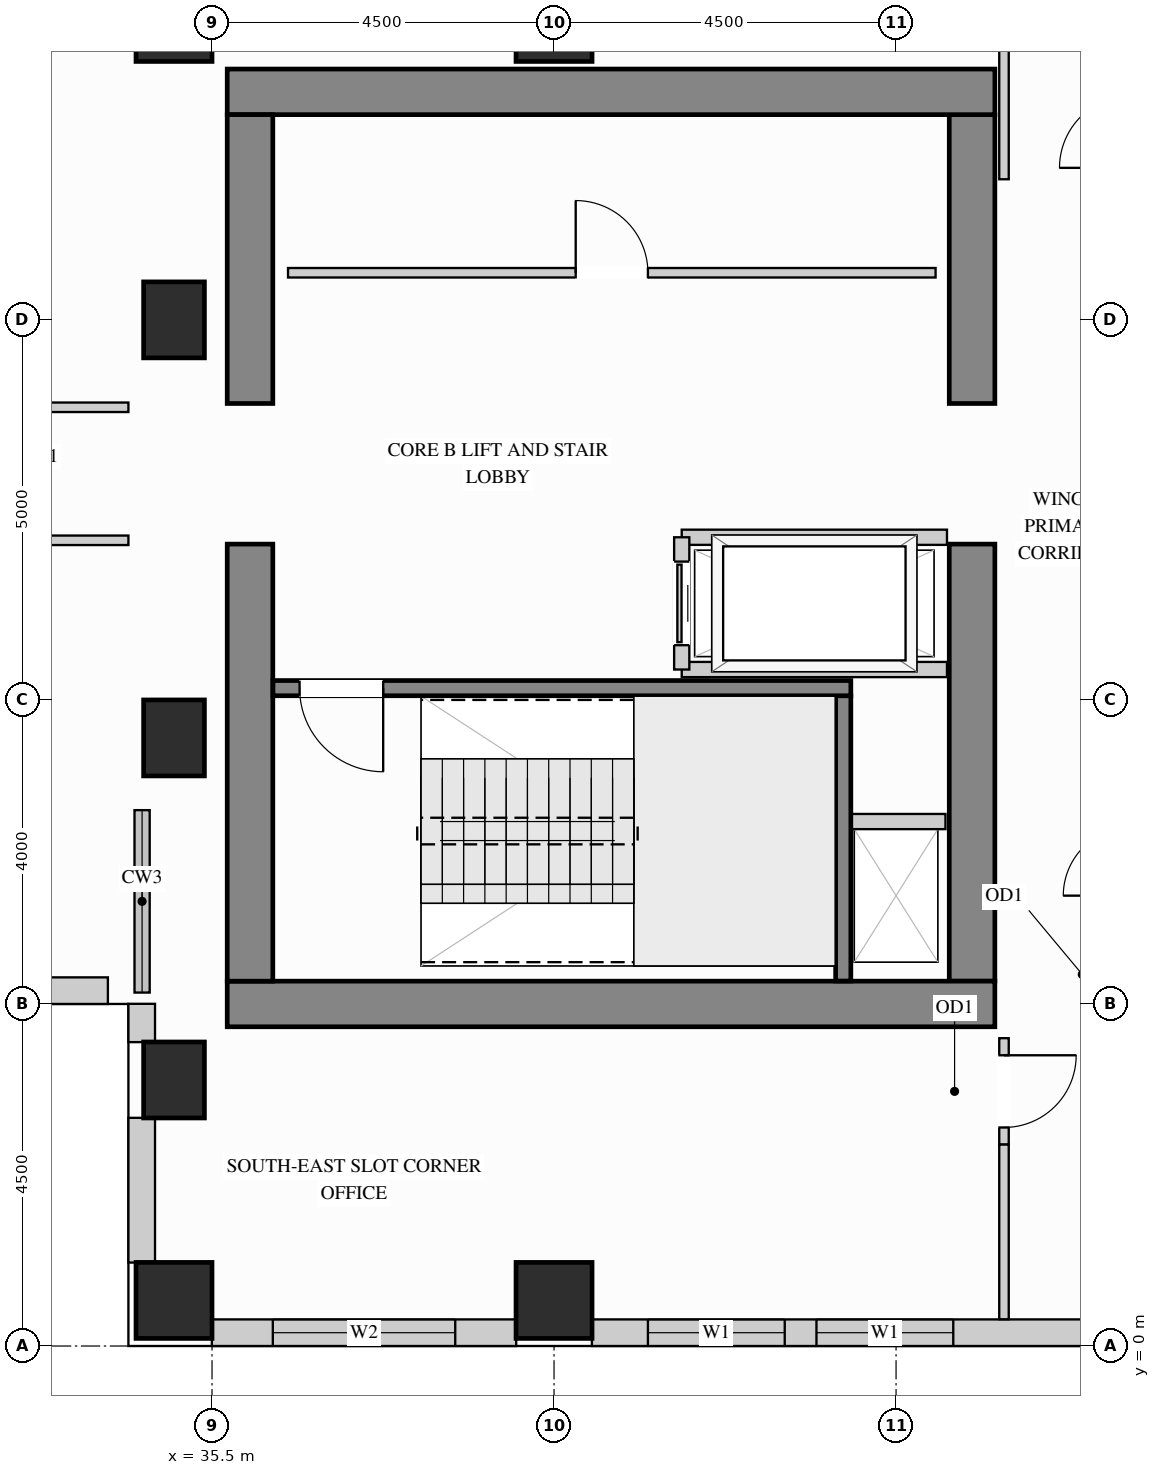
"""IFC4 building model, lengths in metres.
Left out: names, types, materials, properties, quantities, classifications, styles, units other than length and angle.
Written with IfcOpenShell. Run it as: python <this file> out.ifc"""

import sys

from ifc_helpers import new_model, si_unit, direction, frame, frame_2d, origin, origin_2d, place, context, subcontext, project, spatial, rectangle, extrude, source, transform, mapped, element, fill, save


model = new_model("IFC4")
c1 = context("Model", 3, precision=1e-05, world=origin(), true_north=direction((0.0, 1.0)))
c2 = subcontext(c1, "Body", "Model", "MODEL_VIEW")
j1 = project(units=[si_unit("LENGTHUNIT", "METRE"), si_unit("PLANEANGLEUNIT", "RADIAN")], contexts=[c1])
p1 = place(None, origin())
s1 = spatial("IfcSite", under=j1, at=p1, CompositionType="ELEMENT")
p2 = place(p1, origin())
s2 = spatial("IfcBuilding", under=s1, at=p2, CompositionType="ELEMENT")
p3 = place(p2, frame((0.0, 0.0, 146.7)))
s3 = spatial("IfcBuildingStorey", under=s2, at=p3, CompositionType="ELEMENT", Elevation=146.7)
m1 = source(origin(), c2, "Body", "SweptSolid", [
    extrude(rectangle(XDim=0.8, YDim=1.0, at=origin_2d()), origin(), (0.0, 0.0, 1.0), 3.4),
])
for number, where, z_axis, x_axis in (
    (1, (35.0, 13.5, 0.0), (0.0, 0.0, 1.0), (1.0, 0.0, 0.0)),
    (2, (35.0, 3.5, 0.0), (0.0, 0.0, 1.0), (1.0, 0.0, 0.0)),
    (3, (35.0, 8.0, 0.0), (0.0, 0.0, 1.0), (1.0, 0.0, 0.0)),
):
    element("IfcColumn", number, at=place(p3, frame(where, z_axis=z_axis, x_axis=x_axis)), inside=s3, PredefinedType="COLUMN", context=c2, shape_type="MappedRepresentation", body=[
        mapped(m1, transform((0.0, 0.0, 0.0), x_axis=(1.0, 0.0, 0.0), y_axis=(0.0, 1.0, 0.0), z_axis=(0.0, 0.0, 1.0))),
    ])
m2 = source(origin(), c2, "Body", "SweptSolid", [
    extrude(rectangle(XDim=1.0, YDim=1.0, at=origin_2d()), origin(), (0.0, 0.0, 1.0), 3.4),
])
for number, where, z_axis, x_axis in (
    (4, (35.0, 17.4, 0.0), (0.0, 0.0, 1.0), (1.0, 0.0, 0.0)),
    (5, (40.0, 17.4, 0.0), (0.0, 0.0, 1.0), (1.0, 0.0, 0.0)),
    (6, (35.0, 0.6, 0.0), (0.0, 0.0, 1.0), (1.0, 0.0, 0.0)),
    (7, (40.0, 0.6, 0.0), (0.0, 0.0, 1.0), (1.0, 0.0, 0.0)),
):
    element("IfcColumn", number, at=place(p3, frame(where, z_axis=z_axis, x_axis=x_axis)), inside=s3, PredefinedType="COLUMN", context=c2, shape_type="MappedRepresentation", body=[
        mapped(m2, transform((0.0, 0.0, 0.0), x_axis=(1.0, 0.0, 0.0), y_axis=(0.0, 1.0, 0.0), z_axis=(0.0, 0.0, 1.0))),
    ])
m3 = source(origin(), c2, "Body", "SweptSolid", [
    extrude(rectangle(XDim=5.75, YDim=0.6, at=frame_2d((2.875, 0.0))), origin(), (0.0, 0.0, 1.0), 3.4),
])
p4 = place(p3, frame((45.5, 4.8, 0.0), z_axis=(0.0, 0.0, 1.0), x_axis=(0.0, 1.0, 0.0)))
e8 = element("IfcWall", 8, at=p4, inside=s3, PredefinedType="SHEAR", context=c2, shape_type="MappedRepresentation", body=[
    mapped(m3, transform((0.0, 0.0, 0.0), x_axis=(1.0, 0.0, 0.0), y_axis=(0.0, 1.0, 0.0), z_axis=(0.0, 0.0, 1.0))),
])
m4 = source(origin(), c2, "Body", "SweptSolid", [
    extrude(rectangle(XDim=3.8, YDim=0.6, at=frame_2d((1.9, 0.0))), origin(), (0.0, 0.0, 1.0), 3.4),
])
p5 = place(p3, frame((45.5, 12.4, 0.0), z_axis=(0.0, 0.0, 1.0), x_axis=(0.0, 1.0, 0.0)))
e9 = element("IfcWall", 9, at=p5, inside=s3, PredefinedType="SHEAR", context=c2, shape_type="MappedRepresentation", body=[
    mapped(m4, transform((0.0, 0.0, 0.0), x_axis=(1.0, 0.0, 0.0), y_axis=(0.0, 1.0, 0.0), z_axis=(0.0, 0.0, 1.0))),
])
m5 = source(origin(), c2, "Body", "SweptSolid", [
    extrude(rectangle(XDim=10.1, YDim=0.6, at=frame_2d((5.05, 0.0))), origin(), (0.0, 0.0, 1.0), 3.4),
])
for number, where, z_axis, x_axis in (
    (10, (35.7, 16.5, 0.0), (0.0, 0.0, 1.0), (1.0, 0.0, 0.0)),
    (11, (35.7, 4.5, 0.0), (0.0, 0.0, 1.0), (1.0, 0.0, 0.0)),
):
    element("IfcWall", number, at=place(p3, frame(where, z_axis=z_axis, x_axis=x_axis)), inside=s3, PredefinedType="SHEAR", context=c2, shape_type="MappedRepresentation", body=[
        mapped(m5, transform((0.0, 0.0, 0.0), x_axis=(1.0, 0.0, 0.0), y_axis=(0.0, 1.0, 0.0), z_axis=(0.0, 0.0, 1.0))),
    ])
p6 = place(p3, frame((36.0, 4.8, 0.0), z_axis=(0.0, 0.0, 1.0), x_axis=(0.0, 1.0, 0.0)))
e12 = element("IfcWall", 12, at=p6, inside=s3, PredefinedType="SHEAR", context=c2, shape_type="MappedRepresentation", body=[
    mapped(m3, transform((0.0, 0.0, 0.0), x_axis=(1.0, 0.0, 0.0), y_axis=(0.0, 1.0, 0.0), z_axis=(0.0, 0.0, 1.0))),
])
p7 = place(p3, frame((36.0, 12.4, 0.0), z_axis=(0.0, 0.0, 1.0), x_axis=(0.0, 1.0, 0.0)))
e13 = element("IfcWall", 13, at=p7, inside=s3, PredefinedType="SHEAR", context=c2, shape_type="MappedRepresentation", body=[
    mapped(m4, transform((0.0, 0.0, 0.0), x_axis=(1.0, 0.0, 0.0), y_axis=(0.0, 1.0, 0.0), z_axis=(0.0, 0.0, 1.0))),
])
p8 = place(p3, frame((19.15, 4.675, 0.0), z_axis=(0.0, 0.0, 1.0), x_axis=(1.0, 0.0, 0.0)))
e14 = element("IfcWall", 14, at=p8, inside=s3, PredefinedType="SOLIDWALL", context=c2, shape_type="SweptSolid", body=[
    extrude(rectangle(XDim=14.98, YDim=0.35, at=frame_2d((7.49, 0.0))), origin(), (0.0, 0.0, 1.0), 3.385),
])
p9 = place(p8, frame((1.73, 0.0, 0.78)))
e15 = element("IfcOpeningElement", 15, at=p9, cuts=e14, PredefinedType="OPENING", context=c2, shape_type="SweptSolid", body=[
    extrude(rectangle(XDim=1.5, YDim=2.0, at=frame_2d((0.75, 1.0))), frame((0.0, 0.185, 0.0), z_axis=(0.0, -1.0, 0.0), x_axis=(1.0, 0.0, 0.0)), (0.0, 0.0, 1.0), 0.37),
])
p10 = place(p8, frame((4.64, 0.0, 0.78)))
e16 = element("IfcOpeningElement", 16, at=p10, cuts=e14, PredefinedType="OPENING", context=c2, shape_type="SweptSolid", body=[
    extrude(rectangle(XDim=1.5, YDim=2.0, at=frame_2d((0.75, 1.0))), frame((0.0, 0.185, 0.0), z_axis=(0.0, -1.0, 0.0), x_axis=(1.0, 0.0, 0.0)), (0.0, 0.0, 1.0), 0.37),
])
p11 = place(p8, frame((9.253, 0.0, 0.78)))
e17 = element("IfcOpeningElement", 17, at=p11, cuts=e14, PredefinedType="OPENING", context=c2, shape_type="SweptSolid", body=[
    extrude(rectangle(XDim=1.5, YDim=2.0, at=frame_2d((0.75, 1.0))), frame((0.0, 0.185, 0.0), z_axis=(0.0, -1.0, 0.0), x_axis=(1.0, 0.0, 0.0)), (0.0, 0.0, 1.0), 0.37),
])
p12 = place(p8, frame((11.957, 0.0, 0.78)))
e18 = element("IfcOpeningElement", 18, at=p12, cuts=e14, PredefinedType="OPENING", context=c2, shape_type="SweptSolid", body=[
    extrude(rectangle(XDim=1.5, YDim=2.0, at=frame_2d((0.75, 1.0))), frame((0.0, 0.185, 0.0), z_axis=(0.0, -1.0, 0.0), x_axis=(1.0, 0.0, 0.0)), (0.0, 0.0, 1.0), 0.37),
])
m6 = source(origin(), c2, "Body", "SweptSolid", [
    extrude(rectangle(XDim=0.504, YDim=0.35, at=frame_2d((0.252, 0.0))), origin(), (0.0, 0.0, 1.0), 3.385),
])
p13 = place(p3, frame((34.575, 4.502, 0.0), z_axis=(0.0, 0.0, 1.0), x_axis=(0.0, -1.0, 0.0)))
e19 = element("IfcWall", 19, at=p13, inside=s3, PredefinedType="SOLIDWALL", context=c2, shape_type="MappedRepresentation", body=[
    mapped(m6, transform((0.0, 0.0, 0.0), x_axis=(1.0, 0.0, 0.0), y_axis=(0.0, 1.0, 0.0), z_axis=(0.0, 0.0, 1.0))),
])
m7 = source(origin(), c2, "Body", "SweptSolid", [
    extrude(rectangle(XDim=1.904, YDim=0.35, at=frame_2d((0.952, 0.0))), origin(), (0.0, 0.0, 1.0), 2.612),
])
p14 = place(p3, frame((34.575, 3.002, 0.0), z_axis=(0.0, 0.0, 1.0), x_axis=(0.0, -1.0, 0.0)))
e20 = element("IfcWall", 20, at=p14, inside=s3, PredefinedType="SOLIDWALL", context=c2, shape_type="MappedRepresentation", body=[
    mapped(m7, transform((0.0, 0.0, 0.0), x_axis=(1.0, 0.0, 0.0), y_axis=(0.0, 1.0, 0.0), z_axis=(0.0, 0.0, 1.0))),
])
p15 = place(p3, frame((35.498, 0.175, 0.0), z_axis=(0.0, 0.0, 1.0), x_axis=(1.0, 0.0, 0.0)))
e21 = element("IfcWall", 21, at=p15, inside=s3, PredefinedType="SOLIDWALL", context=c2, shape_type="SweptSolid", body=[
    extrude(rectangle(XDim=4.004, YDim=0.35, at=frame_2d((2.002, 0.0))), origin(), (0.0, 0.0, 1.0), 2.612),
])
p16 = place(p15, frame((0.802, 0.0, 0.78)))
e22 = element("IfcOpeningElement", 22, at=p16, cuts=e21, PredefinedType="OPENING", context=c2, shape_type="SweptSolid", body=[
    extrude(rectangle(XDim=2.4, YDim=1.652, at=frame_2d((1.2, 0.826))), frame((0.0, 0.185, 0.0), z_axis=(0.0, -1.0, 0.0), x_axis=(1.0, 0.0, 0.0)), (0.0, 0.0, 1.0), 0.37),
])
p17 = place(p3, frame((40.498, 0.175, 0.0), z_axis=(0.0, 0.0, 1.0), x_axis=(1.0, 0.0, 0.0)))
e23 = element("IfcWall", 23, at=p17, inside=s3, PredefinedType="SOLIDWALL", context=c2, shape_type="SweptSolid", body=[
    extrude(rectangle(XDim=6.604, YDim=0.35, at=frame_2d((3.302, 0.0))), origin(), (0.0, 0.0, 1.0), 2.612),
])
p18 = place(p17, frame((0.737, 0.0, 0.78)))
e24 = element("IfcOpeningElement", 24, at=p18, cuts=e23, PredefinedType="OPENING", context=c2, shape_type="SweptSolid", body=[
    extrude(rectangle(XDim=1.8, YDim=1.652, at=frame_2d((0.9, 0.826))), frame((0.0, 0.185, 0.0), z_axis=(0.0, -1.0, 0.0), x_axis=(1.0, 0.0, 0.0)), (0.0, 0.0, 1.0), 0.37),
])
p19 = place(p17, frame((2.955, 0.0, 0.78)))
e25 = element("IfcOpeningElement", 25, at=p19, cuts=e23, PredefinedType="OPENING", context=c2, shape_type="SweptSolid", body=[
    extrude(rectangle(XDim=1.8, YDim=1.652, at=frame_2d((0.9, 0.826))), frame((0.0, 0.185, 0.0), z_axis=(0.0, -1.0, 0.0), x_axis=(1.0, 0.0, 0.0)), (0.0, 0.0, 1.0), 0.37),
])
p20 = place(p3, frame((36.5, 14.12, 0.0), z_axis=(0.0, 0.0, 1.0), x_axis=(1.0, 0.0, 0.0)))
e26 = element("IfcWall", 26, at=p20, inside=s3, PredefinedType="PARTITIONING", context=c2, shape_type="SweptSolid", body=[
    extrude(rectangle(XDim=8.52, YDim=0.125, at=frame_2d((4.26, 0.0))), origin(), (0.0, 0.0, 1.0), 3.385),
])
p21 = place(p20, frame((3.785, 0.0, 0.0)))
e27 = element("IfcOpeningElement", 27, at=p21, cuts=e26, PredefinedType="OPENING", context=c2, shape_type="SweptSolid", body=[
    extrude(rectangle(XDim=0.95, YDim=2.15, at=frame_2d((0.475, 1.075))), frame((0.0, 0.073, 0.0), z_axis=(0.0, -1.0, 0.0), x_axis=(1.0, 0.0, 0.0)), (0.0, 0.0, 1.0), 0.145),
])
m8 = source(origin(), c2, "Body", "SweptSolid", [
    extrude(rectangle(XDim=2.298, YDim=0.125, at=frame_2d((1.149, 0.0))), origin(), (0.0, 0.0, 1.0), 3.385),
])
p22 = place(p3, frame((45.92, 15.35, 0.0), z_axis=(0.0, 0.0, 1.0), x_axis=(0.0, 1.0, 0.0)))
e28 = element("IfcWall", 28, at=p22, inside=s3, PredefinedType="PARTITIONING", context=c2, shape_type="MappedRepresentation", body=[
    mapped(m8, transform((0.0, 0.0, 0.0), x_axis=(1.0, 0.0, 0.0), y_axis=(0.0, 1.0, 0.0), z_axis=(0.0, 0.0, 1.0))),
])
p23 = place(p3, frame((45.92, 2.65, 0.0), z_axis=(0.0, 0.0, 1.0), x_axis=(0.0, 1.0, 0.0)))
e29 = element("IfcWall", 29, at=p23, inside=s3, PredefinedType="PARTITIONING", context=c2, shape_type="SweptSolid", body=[
    extrude(rectangle(XDim=1.4, YDim=0.125, at=frame_2d((0.7, 0.0))), origin(), (0.0, 0.0, 1.0), 3.385),
])
p24 = place(p23, frame((0.225, 0.0, 0.0)))
e30 = element("IfcOpeningElement", 30, at=p24, cuts=e29, PredefinedType="OPENING", context=c2, shape_type="SweptSolid", body=[
    extrude(rectangle(XDim=0.95, YDim=2.15, at=frame_2d((0.475, 1.075))), frame((0.0, 0.073, 0.0), z_axis=(0.0, -1.0, 0.0), x_axis=(1.0, 0.0, 0.0)), (0.0, 0.0, 1.0), 0.145),
])
p25 = place(p3, frame((45.92, 0.352, 0.0), z_axis=(0.0, 0.0, 1.0), x_axis=(0.0, 1.0, 0.0)))
e31 = element("IfcWall", 31, at=p25, inside=s3, PredefinedType="PARTITIONING", context=c2, shape_type="MappedRepresentation", body=[
    mapped(m8, transform((0.0, 0.0, 0.0), x_axis=(1.0, 0.0, 0.0), y_axis=(0.0, 1.0, 0.0), z_axis=(0.0, 0.0, 1.0))),
])
p26 = place(p3, frame((29.85, 12.35, 0.0), z_axis=(0.0, 0.0, 1.0), x_axis=(1.0, 0.0, 0.0)))
e32 = element("IfcWall", 32, at=p26, inside=s3, PredefinedType="PARTITIONING", context=c2, shape_type="SweptSolid", body=[
    extrude(rectangle(XDim=4.55, YDim=0.125, at=frame_2d((2.275, 0.0))), origin(), (0.0, 0.0, 1.0), 3.385),
])
p27 = place(p26, frame((1.8, 0.0, 0.0)))
e33 = element("IfcOpeningElement", 33, at=p27, cuts=e32, PredefinedType="OPENING", context=c2, shape_type="SweptSolid", body=[
    extrude(rectangle(XDim=0.95, YDim=2.15, at=frame_2d((0.475, 1.075))), frame((0.0, 0.073, 0.0), z_axis=(0.0, -1.0, 0.0), x_axis=(1.0, 0.0, 0.0)), (0.0, 0.0, 1.0), 0.145),
])
p28 = place(p3, frame((26.95, 10.6, 0.0), z_axis=(0.0, 0.0, 1.0), x_axis=(1.0, 0.0, 0.0)))
e34 = element("IfcWall", 34, at=p28, inside=s3, PredefinedType="PARTITIONING", context=c2, shape_type="SweptSolid", body=[
    extrude(rectangle(XDim=7.45, YDim=0.125, at=frame_2d((3.725, 0.0))), origin(), (0.0, 0.0, 1.0), 3.385),
])
p29 = place(p28, frame((4.478, 0.0, 0.0)))
e35 = element("IfcOpeningElement", 35, at=p29, cuts=e34, PredefinedType="OPENING", context=c2, shape_type="SweptSolid", body=[
    extrude(rectangle(XDim=0.95, YDim=2.15, at=frame_2d((0.475, 1.075))), frame((0.0, 0.073, 0.0), z_axis=(0.0, -1.0, 0.0), x_axis=(1.0, 0.0, 0.0)), (0.0, 0.0, 1.0), 0.145),
])
m9 = source(origin(), c2, "Body", "SweptSolid", [
    extrude(rectangle(XDim=1.3, YDim=0.2, at=frame_2d((0.65, 0.0))), origin(), (0.0, 0.0, 1.0), 3.385),
])
p30 = place(p3, frame((43.85, 6.9, 0.0), z_axis=(0.0, 0.0, 1.0), x_axis=(1.0, 0.0, 0.0)))
e36 = element("IfcWall", 36, at=p30, inside=s3, PredefinedType="PARTITIONING", context=c2, shape_type="MappedRepresentation", body=[
    mapped(m9, transform((0.0, 0.0, 0.0), x_axis=(1.0, 0.0, 0.0), y_axis=(0.0, 1.0, 0.0), z_axis=(0.0, 0.0, 1.0))),
])
m10 = source(origin(), c2, "Body", "SweptSolid", [
    extrude(rectangle(XDim=3.49, YDim=0.2, at=frame_2d((1.745, 0.0))), origin(), (0.0, 0.0, 1.0), 3.385),
])
for number, where, z_axis, x_axis in (
    (37, (41.68, 10.64, 0.0), (0.0, 0.0, 1.0), (1.0, 0.0, 0.0)),
    (38, (41.68, 8.9, 0.0), (0.0, 0.0, 1.0), (1.0, 0.0, 0.0)),
):
    element("IfcWall", number, at=place(p3, frame(where, z_axis=z_axis, x_axis=x_axis)), inside=s3, PredefinedType="PARTITIONING", context=c2, shape_type="MappedRepresentation", body=[
        mapped(m10, transform((0.0, 0.0, 0.0), x_axis=(1.0, 0.0, 0.0), y_axis=(0.0, 1.0, 0.0), z_axis=(0.0, 0.0, 1.0))),
    ])
p31 = place(p3, frame((41.68, 8.9, 0.0), z_axis=(0.0, 0.0, 1.0), x_axis=(0.0, 1.0, 0.0)))
e39 = element("IfcWall", 39, at=p31, inside=s3, PredefinedType="PARTITIONING", context=c2, shape_type="SweptSolid", body=[
    extrude(rectangle(XDim=1.74, YDim=0.2, at=frame_2d((0.87, 0.0))), origin(), (0.0, 0.0, 1.0), 3.385),
])
p32 = place(p31, frame((0.32, 0.0, 0.0)))
e40 = element("IfcOpeningElement", 40, at=p32, cuts=e39, PredefinedType="OPENING", context=c2, shape_type="SweptSolid", body=[
    extrude(rectangle(XDim=1.1, YDim=2.2, at=frame_2d((0.55, 1.1))), frame((0.0, 0.11, 0.0), z_axis=(0.0, -1.0, 0.0), x_axis=(1.0, 0.0, 0.0)), (0.0, 0.0, 1.0), 0.22),
])
m11 = source(origin(), c2, "Body", "SweptSolid", [
    extrude(rectangle(XDim=3.753, YDim=0.2, at=frame_2d((1.876, 0.0))), origin(), (0.0, 0.0, 1.0), 3.4),
])
p33 = place(p3, frame((43.805, 4.802, 0.0), z_axis=(0.0, 0.0, 1.0), x_axis=(0.0, 1.0, 0.0)))
e41 = element("IfcWall", 41, at=p33, inside=s3, PredefinedType="SHEAR", context=c2, shape_type="MappedRepresentation", body=[
    mapped(m11, transform((0.0, 0.0, 0.0), x_axis=(1.0, 0.0, 0.0), y_axis=(0.0, 1.0, 0.0), z_axis=(0.0, 0.0, 1.0))),
])
p34 = place(p3, frame((36.302, 8.655, 0.0), z_axis=(0.0, 0.0, 1.0), x_axis=(1.0, 0.0, 0.0)))
e42 = element("IfcWall", 42, at=p34, inside=s3, PredefinedType="SHEAR", context=c2, shape_type="SweptSolid", body=[
    extrude(rectangle(XDim=7.603, YDim=0.2, at=frame_2d((3.802, 0.0))), origin(), (0.0, 0.0, 1.0), 3.4),
])
p35 = place(p34, frame((0.35, 0.0, 0.0)))
e43 = element("IfcOpeningElement", 43, at=p35, cuts=e42, PredefinedType="OPENING", context=c2, shape_type="SweptSolid", body=[
    extrude(rectangle(XDim=1.1, YDim=2.15, at=frame_2d((0.55, 1.075))), frame((0.0, 0.11, 0.0), z_axis=(0.0, -1.0, 0.0), x_axis=(1.0, 0.0, 0.0)), (0.0, 0.0, 1.0), 0.22),
])
m12 = source(origin(), c2, "Body", "SweptSolid", [
    extrude(rectangle(XDim=1.1, YDim=2.2, at=frame_2d((0.55, 1.1))), frame((0.0, 0.025, 0.0), z_axis=(0.0, -1.0, 0.0), x_axis=(1.0, 0.0, 0.0)), (0.0, 0.0, 1.0), 0.05),
])
p36 = place(p32, origin())
e44 = element("IfcDoor", 44, at=p36, inside=s3, OperationType="SLIDING_TO_LEFT", PredefinedType="DOOR", context=c2, shape_type="MappedRepresentation", body=[
    mapped(m12, transform((0.0, 0.0, 0.0), x_axis=(1.0, 0.0, 0.0), y_axis=(0.0, 1.0, 0.0), z_axis=(0.0, 0.0, 1.0))),
])
fill(e40, e44)
m13 = source(origin(), c2, "Body", "SweptSolid", [
    extrude(rectangle(XDim=0.95, YDim=2.15, at=frame_2d((0.475, 1.075))), frame((0.0, 0.025, 0.0), z_axis=(0.0, -1.0, 0.0), x_axis=(1.0, 0.0, 0.0)), (0.0, 0.0, 1.0), 0.05),
])
p37 = place(p21, origin())
e45 = element("IfcDoor", 45, at=p37, inside=s3, OperationType="SINGLE_SWING_LEFT", PredefinedType="DOOR", context=c2, shape_type="MappedRepresentation", body=[
    mapped(m13, transform((0.0, 0.0, 0.0), x_axis=(1.0, 0.0, 0.0), y_axis=(0.0, 1.0, 0.0), z_axis=(0.0, 0.0, 1.0))),
])
fill(e27, e45)
p38 = place(p24, origin())
e46 = element("IfcDoor", 46, at=p38, inside=s3, OperationType="SINGLE_SWING_RIGHT", PredefinedType="DOOR", context=c2, shape_type="MappedRepresentation", body=[
    mapped(m13, transform((0.0, 0.0, 0.0), x_axis=(1.0, 0.0, 0.0), y_axis=(0.0, 1.0, 0.0), z_axis=(0.0, 0.0, 1.0))),
])
fill(e30, e46)
m14 = source(origin(), c2, "Body", "SweptSolid", [
    extrude(rectangle(XDim=1.1, YDim=2.15, at=frame_2d((0.55, 1.075))), frame((0.0, 0.025, 0.0), z_axis=(0.0, -1.0, 0.0), x_axis=(1.0, 0.0, 0.0)), (0.0, 0.0, 1.0), 0.05),
])
p39 = place(p35, origin())
e47 = element("IfcDoor", 47, at=p39, inside=s3, OperationType="SINGLE_SWING_RIGHT", PredefinedType="DOOR", context=c2, shape_type="MappedRepresentation", body=[
    mapped(m14, transform((0.0, 0.0, 0.0), x_axis=(1.0, 0.0, 0.0), y_axis=(0.0, 1.0, 0.0), z_axis=(0.0, 0.0, 1.0))),
])
fill(e43, e47)
m15 = source(origin(), c2, "Body", "SweptSolid", [
    extrude(rectangle(XDim=1.8, YDim=1.652, at=frame_2d((0.9, 0.826))), frame((0.0, 0.03, 0.0), z_axis=(0.0, -1.0, 0.0), x_axis=(1.0, 0.0, 0.0)), (0.0, 0.0, 1.0), 0.06),
])
p40 = place(p18, origin())
e48 = element("IfcWindow", 48, at=p40, inside=s3, PartitioningType="SINGLE_PANEL", PredefinedType="WINDOW", context=c2, shape_type="MappedRepresentation", body=[
    mapped(m15, transform((0.0, 0.0, 0.0), x_axis=(1.0, 0.0, 0.0), y_axis=(0.0, 1.0, 0.0), z_axis=(0.0, 0.0, 1.0))),
])
fill(e24, e48)
p41 = place(p19, origin())
e49 = element("IfcWindow", 49, at=p41, inside=s3, PartitioningType="SINGLE_PANEL", PredefinedType="WINDOW", context=c2, shape_type="MappedRepresentation", body=[
    mapped(m15, transform((0.0, 0.0, 0.0), x_axis=(1.0, 0.0, 0.0), y_axis=(0.0, 1.0, 0.0), z_axis=(0.0, 0.0, 1.0))),
])
fill(e25, e49)
m16 = source(origin(), c2, "Body", "SweptSolid", [
    extrude(rectangle(XDim=2.4, YDim=1.652, at=frame_2d((1.2, 0.826))), frame((0.0, 0.03, 0.0), z_axis=(0.0, -1.0, 0.0), x_axis=(1.0, 0.0, 0.0)), (0.0, 0.0, 1.0), 0.06),
])
p42 = place(p16, origin())
e50 = element("IfcWindow", 50, at=p42, inside=s3, PartitioningType="SINGLE_PANEL", PredefinedType="WINDOW", context=c2, shape_type="MappedRepresentation", body=[
    mapped(m16, transform((0.0, 0.0, 0.0), x_axis=(1.0, 0.0, 0.0), y_axis=(0.0, 1.0, 0.0), z_axis=(0.0, 0.0, 1.0))),
])
fill(e22, e50)
save(model, sys.argv[1])
